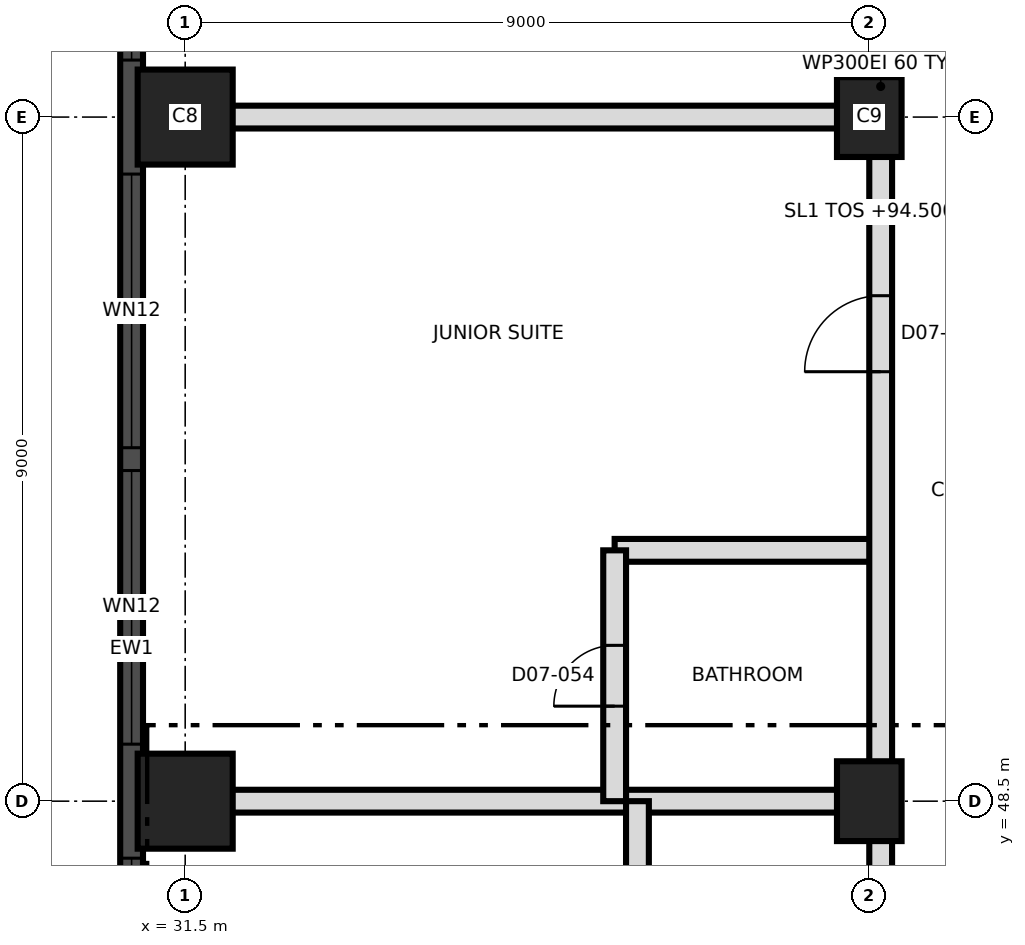
"""IFC4 building model, lengths in metres.
Left out: names, types, materials, properties, quantities, classifications, styles, units other than length and angle.
Written with IfcOpenShell. Run it as: python <this file> out.ifc"""

import sys

from ifc_helpers import new_model, si_unit, direction, frame, frame_2d, origin, origin_2d, place, context, subcontext, project, spatial, rectangle, extrude, element, fill, save


model = new_model("IFC4")
c1 = context("Model", 3, precision=1e-05, world=origin(), true_north=direction((0.0, 1.0)))
c2 = subcontext(c1, "Body", "Model", "MODEL_VIEW")
j1 = project(units=[si_unit("LENGTHUNIT", "METRE"), si_unit("PLANEANGLEUNIT", "RADIAN")], contexts=[c1])
p1 = place(None, origin())
s1 = spatial("IfcSite", under=j1, at=p1, CompositionType="ELEMENT")
p2 = place(p1, origin())
s2 = spatial("IfcBuilding", under=s1, at=p2, CompositionType="ELEMENT")
p3 = place(p2, frame((0.0, 0.0, 94.5)))
s3 = spatial("IfcBuildingStorey", under=s2, at=p3, CompositionType="ELEMENT", Elevation=94.5)
p4 = place(p3, frame((31.5, 48.5, 0.0), z_axis=(0.0, 0.0, 1.0), x_axis=(1.0, 0.0, 0.0)))
e1 = element("IfcColumn", 1, at=p4, inside=s3, PredefinedType="COLUMN", context=c2, shape_type="SweptSolid", body=[
    extrude(rectangle(XDim=1.25, YDim=1.25, at=origin_2d()), origin(), (0.0, 0.0, 1.0), 3.7),
])
p5 = place(p3, frame((40.5, 48.5, 0.0), z_axis=(0.0, 0.0, 1.0), x_axis=(0.0, 1.0, 0.0)))
e2 = element("IfcColumn", 2, at=p5, inside=s3, PredefinedType="COLUMN", context=c2, shape_type="SweptSolid", body=[
    extrude(rectangle(XDim=1.05, YDim=0.85, at=origin_2d()), origin(), (0.0, 0.0, 1.0), 3.7),
])
p6 = place(p3, frame((31.5, 57.5, 0.0), z_axis=(0.0, 0.0, 1.0), x_axis=(1.0, 0.0, 0.0)))
e3 = element("IfcColumn", 3, at=p6, inside=s3, PredefinedType="COLUMN", context=c2, shape_type="SweptSolid", body=[
    extrude(rectangle(XDim=1.25, YDim=1.25, at=origin_2d()), origin(), (0.0, 0.0, 1.0), 3.7),
])
p7 = place(p3, frame((40.5, 57.5, 0.0), z_axis=(0.0, 0.0, 1.0), x_axis=(0.0, 1.0, 0.0)))
e4 = element("IfcColumn", 4, at=p7, inside=s3, PredefinedType="COLUMN", context=c2, shape_type="SweptSolid", body=[
    extrude(rectangle(XDim=1.05, YDim=0.85, at=origin_2d()), origin(), (0.0, 0.0, 1.0), 3.7),
])
p8 = place(p3, frame((30.795, 66.992, 0.0), z_axis=(0.0, 0.0, 1.0), x_axis=(0.0, -1.0, 0.0)))
e5 = element("IfcWall", 5, at=p8, inside=s3, PredefinedType="SOLIDWALL", context=c2, shape_type="SweptSolid", body=[
    extrude(rectangle(XDim=32.981, YDim=0.3, at=frame_2d((16.491, 0.0))), origin(), (0.0, 0.0, 1.0), 3.4),
])
p9 = place(p8, frame((1.596, 0.0, 0.3)))
e6 = element("IfcOpeningElement", 6, at=p9, cuts=e5, PredefinedType="OPENING", context=c2, shape_type="SweptSolid", body=[
    extrude(rectangle(XDim=1.8, YDim=2.4, at=frame_2d((0.9, 1.2))), frame((0.0, 0.16, 0.0), z_axis=(0.0, -1.0, 0.0), x_axis=(1.0, 0.0, 0.0)), (0.0, 0.0, 1.0), 0.32),
])
p10 = place(p8, frame((5.142, 0.0, 0.9)))
e7 = element("IfcOpeningElement", 7, at=p10, cuts=e5, PredefinedType="OPENING", context=c2, shape_type="SweptSolid", body=[
    extrude(rectangle(XDim=3.6, YDim=1.5, at=frame_2d((1.8, 0.75))), frame((0.0, 0.16, 0.0), z_axis=(0.0, -1.0, 0.0), x_axis=(1.0, 0.0, 0.0)), (0.0, 0.0, 1.0), 0.32),
])
p11 = place(p8, frame((10.242, 0.0, 0.9)))
e8 = element("IfcOpeningElement", 8, at=p11, cuts=e5, PredefinedType="OPENING", context=c2, shape_type="SweptSolid", body=[
    extrude(rectangle(XDim=3.6, YDim=1.5, at=frame_2d((1.8, 0.75))), frame((0.0, 0.16, 0.0), z_axis=(0.0, -1.0, 0.0), x_axis=(1.0, 0.0, 0.0)), (0.0, 0.0, 1.0), 0.32),
])
p12 = place(p8, frame((14.142, 0.0, 0.9)))
e9 = element("IfcOpeningElement", 9, at=p12, cuts=e5, PredefinedType="OPENING", context=c2, shape_type="SweptSolid", body=[
    extrude(rectangle(XDim=3.6, YDim=1.5, at=frame_2d((1.8, 0.75))), frame((0.0, 0.16, 0.0), z_axis=(0.0, -1.0, 0.0), x_axis=(1.0, 0.0, 0.0)), (0.0, 0.0, 1.0), 0.32),
])
p13 = place(p8, frame((19.242, 0.0, 0.9)))
e10 = element("IfcOpeningElement", 10, at=p13, cuts=e5, PredefinedType="OPENING", context=c2, shape_type="SweptSolid", body=[
    extrude(rectangle(XDim=3.6, YDim=1.5, at=frame_2d((1.8, 0.75))), frame((0.0, 0.16, 0.0), z_axis=(0.0, -1.0, 0.0), x_axis=(1.0, 0.0, 0.0)), (0.0, 0.0, 1.0), 0.32),
])
p14 = place(p8, frame((23.142, 0.0, 0.9)))
e11 = element("IfcOpeningElement", 11, at=p14, cuts=e5, PredefinedType="OPENING", context=c2, shape_type="SweptSolid", body=[
    extrude(rectangle(XDim=4.2, YDim=1.5, at=frame_2d((2.1, 0.75))), frame((0.0, 0.16, 0.0), z_axis=(0.0, -1.0, 0.0), x_axis=(1.0, 0.0, 0.0)), (0.0, 0.0, 1.0), 0.32),
])
p15 = place(p8, frame((29.337, 0.0, 0.3)))
e12 = element("IfcOpeningElement", 12, at=p15, cuts=e5, PredefinedType="OPENING", context=c2, shape_type="SweptSolid", body=[
    extrude(rectangle(XDim=1.8, YDim=2.4, at=frame_2d((0.9, 1.2))), frame((0.0, 0.16, 0.0), z_axis=(0.0, -1.0, 0.0), x_axis=(1.0, 0.0, 0.0)), (0.0, 0.0, 1.0), 0.32),
])
p16 = place(p3, frame((30.995, 48.5, 0.0), z_axis=(0.0, 0.0, 1.0), x_axis=(1.0, 0.0, 0.0)))
e13 = element("IfcWall", 13, at=p16, inside=s3, PredefinedType="PARTITIONING", context=c2, shape_type="SweptSolid", body=[
    extrude(rectangle(XDim=9.655, YDim=0.3, at=frame_2d((4.827, 0.0))), origin(), (0.0, 0.0, 1.0), 3.35),
])
p17 = place(p3, frame((37.15, 51.8, 0.0), z_axis=(0.0, 0.0, 1.0), x_axis=(1.0, 0.0, 0.0)))
e14 = element("IfcWall", 14, at=p17, inside=s3, PredefinedType="PARTITIONING", context=c2, shape_type="SweptSolid", body=[
    extrude(rectangle(XDim=3.5, YDim=0.3, at=frame_2d((1.75, 0.0))), origin(), (0.0, 0.0, 1.0), 3.4),
])
p18 = place(p3, frame((30.995, 57.5, 0.0), z_axis=(0.0, 0.0, 1.0), x_axis=(1.0, 0.0, 0.0)))
e15 = element("IfcWall", 15, at=p18, inside=s3, PredefinedType="PARTITIONING", context=c2, shape_type="SweptSolid", body=[
    extrude(rectangle(XDim=9.655, YDim=0.3, at=frame_2d((4.827, 0.0))), origin(), (0.0, 0.0, 1.0), 3.35),
])
p19 = place(p3, frame((37.15, 48.5, 0.0), z_axis=(0.0, 0.0, 1.0), x_axis=(0.0, 1.0, 0.0)))
e16 = element("IfcWall", 16, at=p19, inside=s3, PredefinedType="PARTITIONING", context=c2, shape_type="SweptSolid", body=[
    extrude(rectangle(XDim=3.3, YDim=0.3, at=frame_2d((1.65, 0.0))), origin(), (0.0, 0.0, 1.0), 3.4),
])
p20 = place(p19, frame((1.25, 0.0, 0.0)))
e17 = element("IfcOpeningElement", 17, at=p20, cuts=e16, PredefinedType="OPENING", context=c2, shape_type="SweptSolid", body=[
    extrude(rectangle(XDim=0.8, YDim=2.1, at=frame_2d((0.4, 1.05))), frame((0.0, 0.16, 0.0), z_axis=(0.0, -1.0, 0.0), x_axis=(1.0, 0.0, 0.0)), (0.0, 0.0, 1.0), 0.32),
])
p21 = place(p3, frame((37.45, 45.8, 0.0), z_axis=(0.0, 0.0, 1.0), x_axis=(0.0, 1.0, 0.0)))
e18 = element("IfcWall", 18, at=p21, inside=s3, PredefinedType="PARTITIONING", context=c2, shape_type="SweptSolid", body=[
    extrude(rectangle(XDim=2.7, YDim=0.3, at=frame_2d((1.35, 0.0))), origin(), (0.0, 0.0, 1.0), 3.4),
])
p22 = place(p21, frame((0.95, 0.0, 0.0)))
e19 = element("IfcOpeningElement", 19, at=p22, cuts=e18, PredefinedType="OPENING", context=c2, shape_type="SweptSolid", body=[
    extrude(rectangle(XDim=0.8, YDim=2.1, at=frame_2d((0.4, 1.05))), frame((0.0, 0.16, 0.0), z_axis=(0.0, -1.0, 0.0), x_axis=(1.0, 0.0, 0.0)), (0.0, 0.0, 1.0), 0.32),
])
p23 = place(p3, frame((40.65, 39.8, 0.0), z_axis=(0.0, 0.0, 1.0), x_axis=(0.0, 1.0, 0.0)))
e20 = element("IfcWall", 20, at=p23, inside=s3, PredefinedType="PARTITIONING", context=c2, shape_type="SweptSolid", body=[
    extrude(rectangle(XDim=36.205, YDim=0.3, at=frame_2d((18.103, 0.0))), origin(), (0.0, 0.0, 1.0), 3.35),
])
p24 = place(p23, frame((0.835, 0.0, 0.0)))
e21 = element("IfcOpeningElement", 21, at=p24, cuts=e20, PredefinedType="OPENING", context=c2, shape_type="SweptSolid", body=[
    extrude(rectangle(XDim=1.2, YDim=2.1, at=frame_2d((0.6, 1.05))), frame((0.0, 0.16, 0.0), z_axis=(0.0, -1.0, 0.0), x_axis=(1.0, 0.0, 0.0)), (0.0, 0.0, 1.0), 0.32),
])
p25 = place(p23, frame((4.085, 0.0, 0.0)))
e22 = element("IfcOpeningElement", 22, at=p25, cuts=e20, PredefinedType="OPENING", context=c2, shape_type="SweptSolid", body=[
    extrude(rectangle(XDim=1.0, YDim=2.1, at=frame_2d((0.5, 1.05))), frame((0.0, 0.16, 0.0), z_axis=(0.0, -1.0, 0.0), x_axis=(1.0, 0.0, 0.0)), (0.0, 0.0, 1.0), 0.32),
])
p26 = place(p23, frame((14.35, 0.0, 0.0)))
e23 = element("IfcOpeningElement", 23, at=p26, cuts=e20, PredefinedType="OPENING", context=c2, shape_type="SweptSolid", body=[
    extrude(rectangle(XDim=1.0, YDim=2.4, at=frame_2d((0.5, 1.2))), frame((0.0, 0.16, 0.0), z_axis=(0.0, -1.0, 0.0), x_axis=(1.0, 0.0, 0.0)), (0.0, 0.0, 1.0), 0.32),
])
p27 = place(p23, frame((21.2, 0.0, 0.0)))
e24 = element("IfcOpeningElement", 24, at=p27, cuts=e20, PredefinedType="OPENING", context=c2, shape_type="SweptSolid", body=[
    extrude(rectangle(XDim=1.0, YDim=2.4, at=frame_2d((0.5, 1.2))), frame((0.0, 0.16, 0.0), z_axis=(0.0, -1.0, 0.0), x_axis=(1.0, 0.0, 0.0)), (0.0, 0.0, 1.0), 0.32),
])
p28 = place(p10, origin())
e25 = element("IfcWindow", 25, at=p28, inside=s3, PartitioningType="SINGLE_PANEL", PredefinedType="WINDOW", context=c2, shape_type="SweptSolid", body=[
    extrude(rectangle(XDim=3.6, YDim=1.5, at=frame_2d((1.8, 0.75))), frame((0.0, 0.03, 0.0), z_axis=(0.0, -1.0, 0.0), x_axis=(1.0, 0.0, 0.0)), (0.0, 0.0, 1.0), 0.06),
])
fill(e7, e25)
p29 = place(p11, origin())
e26 = element("IfcWindow", 26, at=p29, inside=s3, PartitioningType="SINGLE_PANEL", PredefinedType="WINDOW", context=c2, shape_type="SweptSolid", body=[
    extrude(rectangle(XDim=3.6, YDim=1.5, at=frame_2d((1.8, 0.75))), frame((0.0, 0.03, 0.0), z_axis=(0.0, -1.0, 0.0), x_axis=(1.0, 0.0, 0.0)), (0.0, 0.0, 1.0), 0.06),
])
fill(e8, e26)
p30 = place(p12, origin())
e27 = element("IfcWindow", 27, at=p30, inside=s3, PartitioningType="SINGLE_PANEL", PredefinedType="WINDOW", context=c2, shape_type="SweptSolid", body=[
    extrude(rectangle(XDim=3.6, YDim=1.5, at=frame_2d((1.8, 0.75))), frame((0.0, 0.03, 0.0), z_axis=(0.0, -1.0, 0.0), x_axis=(1.0, 0.0, 0.0)), (0.0, 0.0, 1.0), 0.06),
])
fill(e9, e27)
p31 = place(p13, origin())
e28 = element("IfcWindow", 28, at=p31, inside=s3, PartitioningType="SINGLE_PANEL", PredefinedType="WINDOW", context=c2, shape_type="SweptSolid", body=[
    extrude(rectangle(XDim=3.6, YDim=1.5, at=frame_2d((1.8, 0.75))), frame((0.0, 0.03, 0.0), z_axis=(0.0, -1.0, 0.0), x_axis=(1.0, 0.0, 0.0)), (0.0, 0.0, 1.0), 0.06),
])
fill(e10, e28)
p32 = place(p20, origin())
e29 = element("IfcDoor", 29, at=p32, inside=s3, OperationType="SINGLE_SWING_RIGHT", PredefinedType="DOOR", context=c2, shape_type="SweptSolid", body=[
    extrude(rectangle(XDim=0.8, YDim=2.1, at=frame_2d((0.4, 1.05))), frame((0.0, 0.025, 0.0), z_axis=(0.0, -1.0, 0.0), x_axis=(1.0, 0.0, 0.0)), (0.0, 0.0, 1.0), 0.05),
])
fill(e17, e29)
p33 = place(p26, origin())
e30 = element("IfcDoor", 30, at=p33, inside=s3, OperationType="SINGLE_SWING_LEFT", PredefinedType="DOOR", context=c2, shape_type="SweptSolid", body=[
    extrude(rectangle(XDim=1.0, YDim=2.4, at=frame_2d((0.5, 1.2))), frame((0.0, 0.025, 0.0), z_axis=(0.0, -1.0, 0.0), x_axis=(1.0, 0.0, 0.0)), (0.0, 0.0, 1.0), 0.05),
])
fill(e23, e30)
save(model, sys.argv[1])
